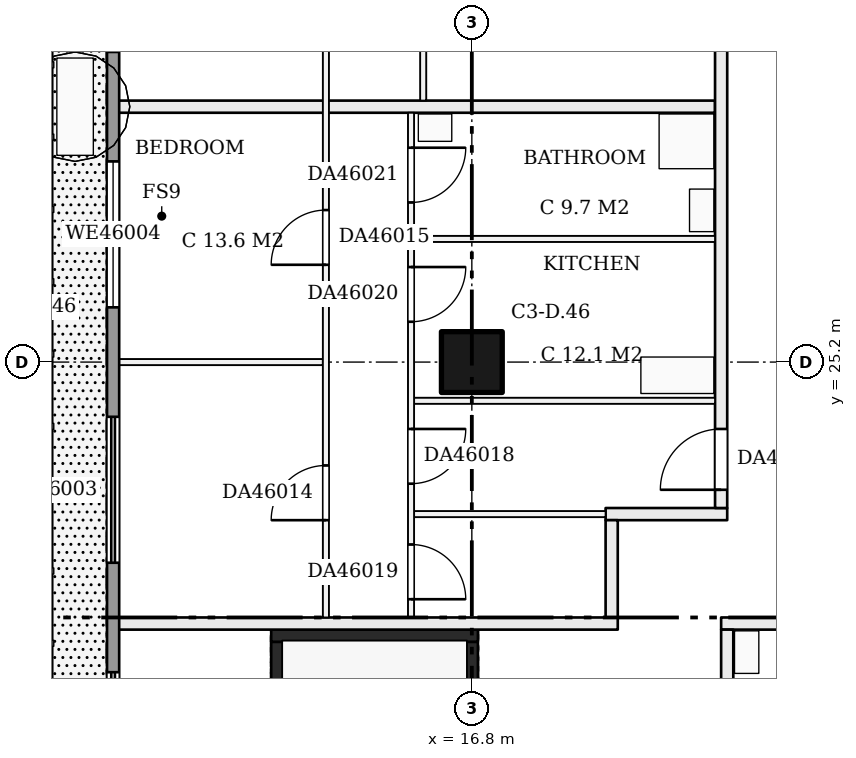
"""IFC4 building model, lengths in metres.
Left out: names, types, materials, properties, quantities, classifications, styles, units other than length and angle.
Written with IfcOpenShell. Run it as: python <this file> out.ifc"""

import sys

from ifc_helpers import new_model, si_unit, direction, frame, frame_2d, origin, origin_2d, place, context, subcontext, project, spatial, rectangle, extrude, element, fill, save


model = new_model("IFC4")
c1 = context("Model", 3, precision=1e-05, world=origin(), true_north=direction((0.0, 1.0)))
c2 = subcontext(c1, "Body", "Model", "MODEL_VIEW")
j1 = project(units=[si_unit("LENGTHUNIT", "METRE"), si_unit("PLANEANGLEUNIT", "RADIAN")], contexts=[c1])
p1 = place(None, origin())
s1 = spatial("IfcSite", under=j1, at=p1, CompositionType="ELEMENT")
p2 = place(p1, origin())
s2 = spatial("IfcBuilding", under=s1, at=p2, CompositionType="ELEMENT")
p3 = place(p2, frame((0.0, 0.0, 179.2)))
s3 = spatial("IfcBuildingStorey", under=s2, at=p3, CompositionType="ELEMENT", Elevation=179.2)
p4 = place(p3, frame((16.8, 25.2, 0.0), z_axis=(0.0, 0.0, 1.0), x_axis=(1.0, 0.0, 0.0)))
e1 = element("IfcColumn", 1, at=p4, inside=s3, PredefinedType="COLUMN", context=c2, shape_type="SweptSolid", body=[
    extrude(rectangle(XDim=1.0, YDim=1.0, at=origin_2d()), origin(), (0.0, 0.0, 1.0), 3.22),
])
p5 = place(p3, frame((13.6, 13.8, 0.0), z_axis=(0.0, 0.0, 1.0), x_axis=(0.0, 1.0, 0.0)))
e2 = element("IfcWall", 2, at=p5, inside=s3, PredefinedType="SHEAR", context=c2, shape_type="SweptSolid", body=[
    extrude(rectangle(XDim=6.8, YDim=0.2, at=frame_2d((3.4, 0.0))), origin(), (0.0, 0.0, 1.0), 3.22),
])
p6 = place(p3, frame((16.8, 13.8, 0.0), z_axis=(0.0, 0.0, 1.0), x_axis=(0.0, 1.0, 0.0)))
e3 = element("IfcWall", 3, at=p6, inside=s3, PredefinedType="SHEAR", context=c2, shape_type="SweptSolid", body=[
    extrude(rectangle(XDim=6.8, YDim=0.2, at=frame_2d((3.4, 0.0))), origin(), (0.0, 0.0, 1.0), 3.22),
])
p7 = place(p6, frame((0.1, 0.0, 0.0)))
e4 = element("IfcOpeningElement", 4, at=p7, cuts=e3, PredefinedType="OPENING", context=c2, shape_type="SweptSolid", body=[
    extrude(rectangle(XDim=1.0, YDim=2.1, at=frame_2d((0.5, 1.05))), frame((0.0, 0.11, 0.0), z_axis=(0.0, -1.0, 0.0), x_axis=(1.0, 0.0, 0.0)), (0.0, 0.0, 1.0), 0.22),
])
p8 = place(p3, frame((13.5, 20.7, 0.0), z_axis=(0.0, 0.0, 1.0), x_axis=(1.0, 0.0, 0.0)))
e5 = element("IfcWall", 5, at=p8, inside=s3, PredefinedType="SHEAR", context=c2, shape_type="SweptSolid", body=[
    extrude(rectangle(XDim=3.4, YDim=0.2, at=frame_2d((1.7, 0.0))), origin(), (0.0, 0.0, 1.0), 3.22),
])
p9 = place(p3, frame((10.9, 20.9, 0.0), z_axis=(0.0, 0.0, 1.0), x_axis=(1.0, 0.0, 0.0)))
e6 = element("IfcWall", 6, at=p9, inside=s3, PredefinedType="PARTITIONING", context=c2, shape_type="SweptSolid", body=[
    extrude(rectangle(XDim=8.3, YDim=0.2, at=frame_2d((4.15, 0.0))), origin(), (0.0, 0.0, 1.0), 3.22),
])
p10 = place(p3, frame((20.9, 20.9, 0.0), z_axis=(0.0, 0.0, 1.0), x_axis=(1.0, 0.0, 0.0)))
e7 = element("IfcWall", 7, at=p10, inside=s3, PredefinedType="PARTITIONING", context=c2, shape_type="SweptSolid", body=[
    extrude(rectangle(XDim=19.3, YDim=0.2, at=frame_2d((9.65, 0.0))), origin(), (0.0, 0.0, 1.0), 3.22),
])
p11 = place(p10, frame((7.016, 0.0, 0.0)))
e8 = element("IfcOpeningElement", 8, at=p11, cuts=e7, PredefinedType="OPENING", context=c2, shape_type="SweptSolid", body=[
    extrude(rectangle(XDim=1.0, YDim=2.1, at=frame_2d((0.5, 1.05))), frame((0.0, 0.11, 0.0), z_axis=(0.0, -1.0, 0.0), x_axis=(1.0, 0.0, 0.0)), (0.0, 0.0, 1.0), 0.22),
])
p12 = place(p3, frame((15.85, 22.7, 0.0), z_axis=(0.0, 0.0, 1.0), x_axis=(1.0, 0.0, 0.0)))
e9 = element("IfcWall", 9, at=p12, inside=s3, PredefinedType="PARTITIONING", context=c2, shape_type="SweptSolid", body=[
    extrude(rectangle(XDim=3.15, YDim=0.1, at=frame_2d((1.575, 0.0))), origin(), (0.0, 0.0, 1.0), 3.22),
])
p13 = place(p3, frame((19.0, 22.7, 0.0), z_axis=(0.0, 0.0, 1.0), x_axis=(1.0, 0.0, 0.0)))
e10 = element("IfcWall", 10, at=p13, inside=s3, PredefinedType="PARTITIONING", context=c2, shape_type="SweptSolid", body=[
    extrude(rectangle(XDim=2.0, YDim=0.2, at=frame_2d((1.0, 0.0))), origin(), (0.0, 0.0, 1.0), 3.22),
])
p14 = place(p3, frame((15.85, 24.563, 0.0), z_axis=(0.0, 0.0, 1.0), x_axis=(1.0, 0.0, 0.0)))
e11 = element("IfcWall", 11, at=p14, inside=s3, PredefinedType="PARTITIONING", context=c2, shape_type="SweptSolid", body=[
    extrude(rectangle(XDim=4.95, YDim=0.1, at=frame_2d((2.475, 0.0))), origin(), (0.0, 0.0, 1.0), 3.22),
])
p15 = place(p3, frame((10.9, 25.2, 0.0), z_axis=(0.0, 0.0, 1.0), x_axis=(1.0, 0.0, 0.0)))
e12 = element("IfcWall", 12, at=p15, inside=s3, PredefinedType="PARTITIONING", context=c2, shape_type="SweptSolid", body=[
    extrude(rectangle(XDim=3.45, YDim=0.1, at=frame_2d((1.725, 0.0))), origin(), (0.0, 0.0, 1.0), 3.22),
])
p16 = place(p3, frame((15.85, 27.225, 0.0), z_axis=(0.0, 0.0, 1.0), x_axis=(1.0, 0.0, 0.0)))
e13 = element("IfcWall", 13, at=p16, inside=s3, PredefinedType="PARTITIONING", context=c2, shape_type="SweptSolid", body=[
    extrude(rectangle(XDim=4.95, YDim=0.1, at=frame_2d((2.475, 0.0))), origin(), (0.0, 0.0, 1.0), 3.22),
])
p17 = place(p3, frame((10.9, 29.4, 0.0), z_axis=(0.0, 0.0, 1.0), x_axis=(1.0, 0.0, 0.0)))
e14 = element("IfcWall", 14, at=p17, inside=s3, PredefinedType="PARTITIONING", context=c2, shape_type="SweptSolid", body=[
    extrude(rectangle(XDim=9.9, YDim=0.2, at=frame_2d((4.95, 0.0))), origin(), (0.0, 0.0, 1.0), 3.22),
])
p18 = place(p3, frame((14.4, 21.0, 0.0), z_axis=(0.0, 0.0, 1.0), x_axis=(0.0, 1.0, 0.0)))
e15 = element("IfcWall", 15, at=p18, inside=s3, PredefinedType="PARTITIONING", context=c2, shape_type="SweptSolid", body=[
    extrude(rectangle(XDim=19.0, YDim=0.1, at=frame_2d((9.5, 0.0))), origin(), (0.0, 0.0, 1.0), 3.22),
])
p19 = place(p18, frame((1.6, 0.0, 0.0)))
e16 = element("IfcOpeningElement", 16, at=p19, cuts=e15, PredefinedType="OPENING", context=c2, shape_type="SweptSolid", body=[
    extrude(rectangle(XDim=0.9, YDim=2.1, at=frame_2d((0.45, 1.05))), frame((0.0, 0.06, 0.0), z_axis=(0.0, -1.0, 0.0), x_axis=(1.0, 0.0, 0.0)), (0.0, 0.0, 1.0), 0.12),
])
p20 = place(p18, frame((5.8, 0.0, 0.0)))
e17 = element("IfcOpeningElement", 17, at=p20, cuts=e15, PredefinedType="OPENING", context=c2, shape_type="SweptSolid", body=[
    extrude(rectangle(XDim=0.9, YDim=2.1, at=frame_2d((0.45, 1.05))), frame((0.0, 0.06, 0.0), z_axis=(0.0, -1.0, 0.0), x_axis=(1.0, 0.0, 0.0)), (0.0, 0.0, 1.0), 0.12),
])
p21 = place(p18, frame((10.0, 0.0, 0.0)))
e18 = element("IfcOpeningElement", 18, at=p21, cuts=e15, PredefinedType="OPENING", context=c2, shape_type="SweptSolid", body=[
    extrude(rectangle(XDim=0.9, YDim=2.1, at=frame_2d((0.45, 1.05))), frame((0.0, 0.06, 0.0), z_axis=(0.0, -1.0, 0.0), x_axis=(1.0, 0.0, 0.0)), (0.0, 0.0, 1.0), 0.12),
])
p22 = place(p18, frame((15.4, 0.0, 0.0)))
e19 = element("IfcOpeningElement", 19, at=p22, cuts=e15, PredefinedType="OPENING", context=c2, shape_type="SweptSolid", body=[
    extrude(rectangle(XDim=0.9, YDim=2.1, at=frame_2d((0.45, 1.05))), frame((0.0, 0.06, 0.0), z_axis=(0.0, -1.0, 0.0), x_axis=(1.0, 0.0, 0.0)), (0.0, 0.0, 1.0), 0.12),
])
p23 = place(p3, frame((15.8, 21.0, 0.0), z_axis=(0.0, 0.0, 1.0), x_axis=(0.0, 1.0, 0.0)))
e20 = element("IfcWall", 20, at=p23, inside=s3, PredefinedType="PARTITIONING", context=c2, shape_type="SweptSolid", body=[
    extrude(rectangle(XDim=8.3, YDim=0.1, at=frame_2d((4.15, 0.0))), origin(), (0.0, 0.0, 1.0), 3.22),
])
p24 = place(p23, frame((2.2, 0.0, 0.0)))
e21 = element("IfcOpeningElement", 21, at=p24, cuts=e20, PredefinedType="OPENING", context=c2, shape_type="SweptSolid", body=[
    extrude(rectangle(XDim=0.9, YDim=2.1, at=frame_2d((0.45, 1.05))), frame((0.0, 0.06, 0.0), z_axis=(0.0, -1.0, 0.0), x_axis=(1.0, 0.0, 0.0)), (0.0, 0.0, 1.0), 0.12),
])
p25 = place(p23, frame((0.3, 0.0, 0.0)))
e22 = element("IfcOpeningElement", 22, at=p25, cuts=e20, PredefinedType="OPENING", context=c2, shape_type="SweptSolid", body=[
    extrude(rectangle(XDim=0.9, YDim=2.1, at=frame_2d((0.45, 1.05))), frame((0.0, 0.06, 0.0), z_axis=(0.0, -1.0, 0.0), x_axis=(1.0, 0.0, 0.0)), (0.0, 0.0, 1.0), 0.12),
])
p26 = place(p23, frame((4.863, 0.0, 0.0)))
e23 = element("IfcOpeningElement", 23, at=p26, cuts=e20, PredefinedType="OPENING", context=c2, shape_type="SweptSolid", body=[
    extrude(rectangle(XDim=0.9, YDim=2.1, at=frame_2d((0.45, 1.05))), frame((0.0, 0.06, 0.0), z_axis=(0.0, -1.0, 0.0), x_axis=(1.0, 0.0, 0.0)), (0.0, 0.0, 1.0), 0.12),
])
p27 = place(p23, frame((6.825, 0.0, 0.0)))
e24 = element("IfcOpeningElement", 24, at=p27, cuts=e20, PredefinedType="OPENING", context=c2, shape_type="SweptSolid", body=[
    extrude(rectangle(XDim=0.9, YDim=2.1, at=frame_2d((0.45, 1.05))), frame((0.0, 0.06, 0.0), z_axis=(0.0, -1.0, 0.0), x_axis=(1.0, 0.0, 0.0)), (0.0, 0.0, 1.0), 0.12),
])
p28 = place(p3, frame((16.0, 29.5, 0.0), z_axis=(0.0, 0.0, 1.0), x_axis=(0.0, 1.0, 0.0)))
e25 = element("IfcWall", 25, at=p28, inside=s3, PredefinedType="PARTITIONING", context=c2, shape_type="SweptSolid", body=[
    extrude(rectangle(XDim=10.5, YDim=0.1, at=frame_2d((5.25, 0.0))), origin(), (0.0, 0.0, 1.0), 3.22),
])
p29 = place(p28, frame((1.1, 0.0, 0.0)))
e26 = element("IfcOpeningElement", 26, at=p29, cuts=e25, PredefinedType="OPENING", context=c2, shape_type="SweptSolid", body=[
    extrude(rectangle(XDim=0.9, YDim=2.1, at=frame_2d((0.45, 1.05))), frame((0.0, 0.06, 0.0), z_axis=(0.0, -1.0, 0.0), x_axis=(1.0, 0.0, 0.0)), (0.0, 0.0, 1.0), 0.12),
])
p30 = place(p28, frame((4.833, 0.0, 0.0)))
e27 = element("IfcOpeningElement", 27, at=p30, cuts=e25, PredefinedType="OPENING", context=c2, shape_type="SweptSolid", body=[
    extrude(rectangle(XDim=0.9, YDim=2.1, at=frame_2d((0.45, 1.05))), frame((0.0, 0.06, 0.0), z_axis=(0.0, -1.0, 0.0), x_axis=(1.0, 0.0, 0.0)), (0.0, 0.0, 1.0), 0.12),
])
p31 = place(p28, frame((8.467, 0.0, 0.0)))
e28 = element("IfcOpeningElement", 28, at=p31, cuts=e25, PredefinedType="OPENING", context=c2, shape_type="SweptSolid", body=[
    extrude(rectangle(XDim=0.9, YDim=2.1, at=frame_2d((0.45, 1.05))), frame((0.0, 0.06, 0.0), z_axis=(0.0, -1.0, 0.0), x_axis=(1.0, 0.0, 0.0)), (0.0, 0.0, 1.0), 0.12),
])
p32 = place(p3, frame((19.1, 21.0, 0.0), z_axis=(0.0, 0.0, 1.0), x_axis=(0.0, 1.0, 0.0)))
e29 = element("IfcWall", 29, at=p32, inside=s3, PredefinedType="PARTITIONING", context=c2, shape_type="SweptSolid", body=[
    extrude(rectangle(XDim=1.6, YDim=0.2, at=frame_2d((0.8, 0.0))), origin(), (0.0, 0.0, 1.0), 3.22),
])
p33 = place(p3, frame((20.9, 22.8, 0.0), z_axis=(0.0, 0.0, 1.0), x_axis=(0.0, 1.0, 0.0)))
e30 = element("IfcWall", 30, at=p33, inside=s3, PredefinedType="PARTITIONING", context=c2, shape_type="SweptSolid", body=[
    extrude(rectangle(XDim=17.2, YDim=0.2, at=frame_2d((8.6, 0.0))), origin(), (0.0, 0.0, 1.0), 3.22),
])
p34 = place(p33, frame((0.3, 0.0, 0.0)))
e31 = element("IfcOpeningElement", 31, at=p34, cuts=e30, PredefinedType="OPENING", context=c2, shape_type="SweptSolid", body=[
    extrude(rectangle(XDim=1.0, YDim=2.1, at=frame_2d((0.5, 1.05))), frame((0.0, 0.11, 0.0), z_axis=(0.0, -1.0, 0.0), x_axis=(1.0, 0.0, 0.0)), (0.0, 0.0, 1.0), 0.22),
])
p35 = place(p33, frame((7.7, 0.0, 0.0)))
e32 = element("IfcOpeningElement", 32, at=p35, cuts=e30, PredefinedType="OPENING", context=c2, shape_type="SweptSolid", body=[
    extrude(rectangle(XDim=1.0, YDim=2.1, at=frame_2d((0.5, 1.05))), frame((0.0, 0.11, 0.0), z_axis=(0.0, -1.0, 0.0), x_axis=(1.0, 0.0, 0.0)), (0.0, 0.0, 1.0), 0.22),
])
p36 = place(p3, frame((21.0, 13.7, 0.0), z_axis=(0.0, 0.0, 1.0), x_axis=(0.0, 1.0, 0.0)))
e33 = element("IfcWall", 33, at=p36, inside=s3, PredefinedType="PARTITIONING", context=c2, shape_type="SweptSolid", body=[
    extrude(rectangle(XDim=7.1, YDim=0.2, at=frame_2d((3.55, 0.0))), origin(), (0.0, 0.0, 1.0), 3.22),
])
p37 = place(p3, frame((10.9, 42.0, 0.0), z_axis=(0.0, 0.0, 1.0), x_axis=(0.0, -1.0, 0.0)))
e34 = element("IfcWall", 34, at=p37, inside=s3, PredefinedType="SOLIDWALL", context=c2, shape_type="SweptSolid", body=[
    extrude(rectangle(XDim=28.6, YDim=0.2, at=frame_2d((14.3, 0.0))), origin(), (0.0, 0.0, 1.0), 3.22),
])
p38 = place(p37, frame((25.9, 0.0, 0.0)))
e35 = element("IfcOpeningElement", 35, at=p38, cuts=e34, PredefinedType="OPENING", context=c2, shape_type="SweptSolid", body=[
    extrude(rectangle(XDim=2.4, YDim=2.2, at=frame_2d((1.2, 1.1))), frame((0.0, 0.11, 0.0), z_axis=(0.0, -1.0, 0.0), x_axis=(1.0, 0.0, 0.0)), (0.0, 0.0, 1.0), 0.22),
])
p39 = place(p37, frame((21.9, 0.0, 0.0)))
e36 = element("IfcOpeningElement", 36, at=p39, cuts=e34, PredefinedType="OPENING", context=c2, shape_type="SweptSolid", body=[
    extrude(rectangle(XDim=2.4, YDim=2.2, at=frame_2d((1.2, 1.1))), frame((0.0, 0.11, 0.0), z_axis=(0.0, -1.0, 0.0), x_axis=(1.0, 0.0, 0.0)), (0.0, 0.0, 1.0), 0.22),
])
p40 = place(p37, frame((17.7, 0.0, 0.0)))
e37 = element("IfcOpeningElement", 37, at=p40, cuts=e34, PredefinedType="OPENING", context=c2, shape_type="SweptSolid", body=[
    extrude(rectangle(XDim=2.4, YDim=2.2, at=frame_2d((1.2, 1.1))), frame((0.0, 0.11, 0.0), z_axis=(0.0, -1.0, 0.0), x_axis=(1.0, 0.0, 0.0)), (0.0, 0.0, 1.0), 0.22),
])
p41 = place(p37, frame((13.5, 0.0, 0.9)))
e38 = element("IfcOpeningElement", 38, at=p41, cuts=e34, PredefinedType="OPENING", context=c2, shape_type="SweptSolid", body=[
    extrude(rectangle(XDim=2.4, YDim=1.5, at=frame_2d((1.2, 0.75))), frame((0.0, 0.11, 0.0), z_axis=(0.0, -1.0, 0.0), x_axis=(1.0, 0.0, 0.0)), (0.0, 0.0, 1.0), 0.22),
])
p42 = place(p37, frame((9.3, 0.0, 0.0)))
e39 = element("IfcOpeningElement", 39, at=p42, cuts=e34, PredefinedType="OPENING", context=c2, shape_type="SweptSolid", body=[
    extrude(rectangle(XDim=2.4, YDim=2.2, at=frame_2d((1.2, 1.1))), frame((0.0, 0.11, 0.0), z_axis=(0.0, -1.0, 0.0), x_axis=(1.0, 0.0, 0.0)), (0.0, 0.0, 1.0), 0.22),
])
p43 = place(p37, frame((5.1, 0.0, 0.9)))
e40 = element("IfcOpeningElement", 40, at=p43, cuts=e34, PredefinedType="OPENING", context=c2, shape_type="SweptSolid", body=[
    extrude(rectangle(XDim=2.4, YDim=1.5, at=frame_2d((1.2, 0.75))), frame((0.0, 0.11, 0.0), z_axis=(0.0, -1.0, 0.0), x_axis=(1.0, 0.0, 0.0)), (0.0, 0.0, 1.0), 0.22),
])
p44 = place(p37, frame((2.0, 0.0, 0.9)))
e41 = element("IfcOpeningElement", 41, at=p44, cuts=e34, PredefinedType="OPENING", context=c2, shape_type="SweptSolid", body=[
    extrude(rectangle(XDim=1.3, YDim=1.5, at=frame_2d((0.65, 0.75))), frame((0.0, 0.11, 0.0), z_axis=(0.0, -1.0, 0.0), x_axis=(1.0, 0.0, 0.0)), (0.0, 0.0, 1.0), 0.22),
])
p45 = place(p19, origin())
e42 = element("IfcDoor", 42, at=p45, inside=s3, OperationType="SINGLE_SWING_LEFT", PredefinedType="DOOR", context=c2, shape_type="SweptSolid", body=[
    extrude(rectangle(XDim=0.9, YDim=2.1, at=frame_2d((0.45, 1.05))), frame((0.0, 0.025, 0.0), z_axis=(0.0, -1.0, 0.0), x_axis=(1.0, 0.0, 0.0)), (0.0, 0.0, 1.0), 0.05),
])
fill(e16, e42)
p46 = place(p20, origin())
e43 = element("IfcDoor", 43, at=p46, inside=s3, OperationType="SINGLE_SWING_LEFT", PredefinedType="DOOR", context=c2, shape_type="SweptSolid", body=[
    extrude(rectangle(XDim=0.9, YDim=2.1, at=frame_2d((0.45, 1.05))), frame((0.0, 0.025, 0.0), z_axis=(0.0, -1.0, 0.0), x_axis=(1.0, 0.0, 0.0)), (0.0, 0.0, 1.0), 0.05),
])
fill(e17, e43)
p47 = place(p24, frame((0.9, 0.0, 0.0), z_axis=(0.0, 0.0, 1.0), x_axis=(-1.0, 0.0, 0.0)))
e44 = element("IfcDoor", 44, at=p47, inside=s3, OperationType="SINGLE_SWING_LEFT", PredefinedType="DOOR", context=c2, shape_type="SweptSolid", body=[
    extrude(rectangle(XDim=0.9, YDim=2.1, at=frame_2d((0.45, 1.05))), frame((0.0, 0.025, 0.0), z_axis=(0.0, -1.0, 0.0), x_axis=(1.0, 0.0, 0.0)), (0.0, 0.0, 1.0), 0.05),
])
fill(e21, e44)
p48 = place(p25, frame((0.9, 0.0, 0.0), z_axis=(0.0, 0.0, 1.0), x_axis=(-1.0, 0.0, 0.0)))
e45 = element("IfcDoor", 45, at=p48, inside=s3, OperationType="SINGLE_SWING_RIGHT", PredefinedType="DOOR", context=c2, shape_type="SweptSolid", body=[
    extrude(rectangle(XDim=0.9, YDim=2.1, at=frame_2d((0.45, 1.05))), frame((0.0, 0.025, 0.0), z_axis=(0.0, -1.0, 0.0), x_axis=(1.0, 0.0, 0.0)), (0.0, 0.0, 1.0), 0.05),
])
fill(e22, e45)
p49 = place(p26, frame((0.9, 0.0, 0.0), z_axis=(0.0, 0.0, 1.0), x_axis=(-1.0, 0.0, 0.0)))
e46 = element("IfcDoor", 46, at=p49, inside=s3, OperationType="SINGLE_SWING_LEFT", PredefinedType="DOOR", context=c2, shape_type="SweptSolid", body=[
    extrude(rectangle(XDim=0.9, YDim=2.1, at=frame_2d((0.45, 1.05))), frame((0.0, 0.025, 0.0), z_axis=(0.0, -1.0, 0.0), x_axis=(1.0, 0.0, 0.0)), (0.0, 0.0, 1.0), 0.05),
])
fill(e23, e46)
p50 = place(p27, frame((0.9, 0.0, 0.0), z_axis=(0.0, 0.0, 1.0), x_axis=(-1.0, 0.0, 0.0)))
e47 = element("IfcDoor", 47, at=p50, inside=s3, OperationType="SINGLE_SWING_LEFT", PredefinedType="DOOR", context=c2, shape_type="SweptSolid", body=[
    extrude(rectangle(XDim=0.9, YDim=2.1, at=frame_2d((0.45, 1.05))), frame((0.0, 0.025, 0.0), z_axis=(0.0, -1.0, 0.0), x_axis=(1.0, 0.0, 0.0)), (0.0, 0.0, 1.0), 0.05),
])
fill(e24, e47)
p51 = place(p34, origin())
e48 = element("IfcDoor", 48, at=p51, inside=s3, OperationType="SINGLE_SWING_LEFT", PredefinedType="DOOR", context=c2, shape_type="SweptSolid", body=[
    extrude(rectangle(XDim=1.0, YDim=2.1, at=frame_2d((0.5, 1.05))), frame((0.0, 0.025, 0.0), z_axis=(0.0, -1.0, 0.0), x_axis=(1.0, 0.0, 0.0)), (0.0, 0.0, 1.0), 0.05),
])
fill(e31, e48)
p52 = place(p39, origin())
e49 = element("IfcDoor", 49, at=p52, inside=s3, OperationType="DOUBLE_DOOR_SLIDING", PredefinedType="DOOR", context=c2, shape_type="SweptSolid", body=[
    extrude(rectangle(XDim=2.4, YDim=2.2, at=frame_2d((1.2, 1.1))), frame((0.0, 0.025, 0.0), z_axis=(0.0, -1.0, 0.0), x_axis=(1.0, 0.0, 0.0)), (0.0, 0.0, 1.0), 0.05),
])
fill(e36, e49)
p53 = place(p40, origin())
e50 = element("IfcDoor", 50, at=p53, inside=s3, OperationType="DOUBLE_DOOR_SLIDING", PredefinedType="DOOR", context=c2, shape_type="SweptSolid", body=[
    extrude(rectangle(XDim=2.4, YDim=2.2, at=frame_2d((1.2, 1.1))), frame((0.0, 0.025, 0.0), z_axis=(0.0, -1.0, 0.0), x_axis=(1.0, 0.0, 0.0)), (0.0, 0.0, 1.0), 0.05),
])
fill(e37, e50)
p54 = place(p41, origin())
e51 = element("IfcWindow", 51, at=p54, inside=s3, PartitioningType="SINGLE_PANEL", PredefinedType="WINDOW", context=c2, shape_type="SweptSolid", body=[
    extrude(rectangle(XDim=2.4, YDim=1.5, at=frame_2d((1.2, 0.75))), frame((0.0, 0.03, 0.0), z_axis=(0.0, -1.0, 0.0), x_axis=(1.0, 0.0, 0.0)), (0.0, 0.0, 1.0), 0.06),
])
fill(e38, e51)
save(model, sys.argv[1])
